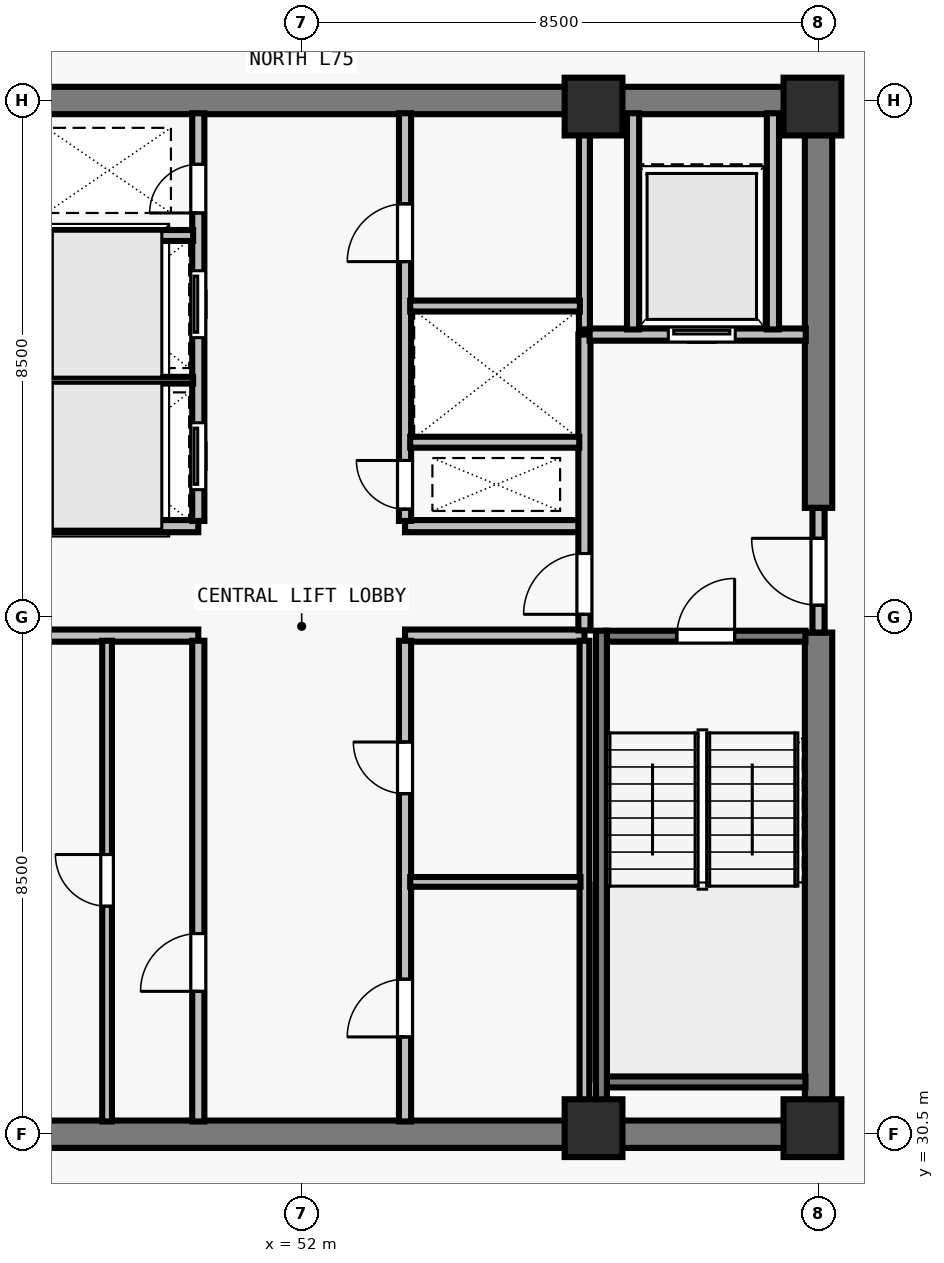
"""IFC4 building model, lengths in metres.
Left out: names, types, materials, properties, quantities, classifications, styles, units other than length and angle.
Written with IfcOpenShell. Run it as: python <this file> out.ifc"""

import sys

from ifc_helpers import new_model, si_unit, direction, frame, frame_2d, origin, origin_2d, place, context, subcontext, project, spatial, rectangle, extrude, element, fill, save


model = new_model("IFC4")
c1 = context("Model", 3, precision=1e-05, world=origin(), true_north=direction((0.0, 1.0)))
c2 = subcontext(c1, "Body", "Model", "MODEL_VIEW")
j1 = project(units=[si_unit("LENGTHUNIT", "METRE"), si_unit("PLANEANGLEUNIT", "RADIAN")], contexts=[c1])
p1 = place(None, origin())
s1 = spatial("IfcSite", under=j1, at=p1, CompositionType="ELEMENT")
p2 = place(p1, origin())
s2 = spatial("IfcBuilding", under=s1, at=p2, CompositionType="ELEMENT")
p3 = place(p2, frame((0.0, 0.0, 272.5)))
s3 = spatial("IfcBuildingStorey", under=s2, at=p3, CompositionType="ELEMENT", Elevation=272.5)
for number, where, z_axis, x_axis in (
    (1, (56.8, 30.6, 0.0), (0.0, 0.0, 1.0), (1.0, 0.0, 0.0)),
    (2, (60.4, 30.6, 0.0), (0.0, 0.0, 1.0), (1.0, 0.0, 0.0)),
    (3, (56.8, 47.4, 0.0), (0.0, 0.0, 1.0), (1.0, 0.0, 0.0)),
    (4, (60.4, 47.4, 0.0), (0.0, 0.0, 1.0), (1.0, 0.0, 0.0)),
):
    element("IfcColumn", number, at=place(p3, frame(where, z_axis=z_axis, x_axis=x_axis)), inside=s3, PredefinedType="COLUMN", context=c2, shape_type="SweptSolid", body=[
        extrude(rectangle(XDim=0.95, YDim=0.95, at=origin_2d()), origin(), (0.0, 0.0, 1.0), 3.5),
    ])
for number, where, z_axis, x_axis in (
    (5, (43.275, 30.5, 0.0), (0.0, 0.0, 1.0), (1.0, 0.0, 0.0)),
    (6, (43.275, 47.5, 0.0), (0.0, 0.0, 1.0), (1.0, 0.0, 0.0)),
):
    element("IfcWall", number, at=place(p3, frame(where, z_axis=z_axis, x_axis=x_axis)), inside=s3, PredefinedType="SHEAR", context=c2, shape_type="SweptSolid", body=[
        extrude(rectangle(XDim=17.45, YDim=0.45, at=frame_2d((8.725, 0.0))), origin(), (0.0, 0.0, 1.0), 3.24),
    ])
p4 = place(p3, frame((60.5, 30.715, 0.0), z_axis=(0.0, 0.0, 1.0), x_axis=(0.0, 1.0, 0.0)))
e7 = element("IfcWall", 7, at=p4, inside=s3, PredefinedType="SHEAR", context=c2, shape_type="SweptSolid", body=[
    extrude(rectangle(XDim=8.035, YDim=0.45, at=frame_2d((4.018, 0.0))), origin(), (0.0, 0.0, 1.0), 3.24),
])
p5 = place(p3, frame((60.5, 40.8, 0.0), z_axis=(0.0, 0.0, 1.0), x_axis=(0.0, 1.0, 0.0)))
e8 = element("IfcWall", 8, at=p5, inside=s3, PredefinedType="SHEAR", context=c2, shape_type="SweptSolid", body=[
    extrude(rectangle(XDim=6.485, YDim=0.45, at=frame_2d((3.242, 0.0))), origin(), (0.0, 0.0, 1.0), 3.24),
])
for number, where, z_axis, x_axis in (
    (9, (47.35, 38.7, 0.0), (0.0, 0.0, 1.0), (1.0, 0.0, 0.0)),
    (10, (47.35, 40.5, 0.0), (0.0, 0.0, 1.0), (1.0, 0.0, 0.0)),
    (11, (53.7, 38.7, 0.0), (0.0, 0.0, 1.0), (1.0, 0.0, 0.0)),
    (12, (53.7, 40.5, 0.0), (0.0, 0.0, 1.0), (1.0, 0.0, 0.0)),
):
    element("IfcWall", number, at=place(p3, frame(where, z_axis=z_axis, x_axis=x_axis)), inside=s3, PredefinedType="SOLIDWALL", context=c2, shape_type="SweptSolid", body=[
        extrude(rectangle(XDim=2.95, YDim=0.2, at=frame_2d((1.475, 0.0))), origin(), (0.0, 0.0, 1.0), 3.24),
    ])
p6 = place(p3, frame((50.3, 30.71, 0.0), z_axis=(0.0, 0.0, 1.0), x_axis=(0.0, 1.0, 0.0)))
e13 = element("IfcWall", 13, at=p6, inside=s3, PredefinedType="SOLIDWALL", context=c2, shape_type="SweptSolid", body=[
    extrude(rectangle(XDim=7.905, YDim=0.2, at=frame_2d((3.953, 0.0))), origin(), (0.0, 0.0, 1.0), 3.24),
])
p7 = place(p6, frame((2.14, 0.0, 0.0)))
e14 = element("IfcOpeningElement", 14, at=p7, cuts=e13, PredefinedType="OPENING", context=c2, shape_type="SweptSolid", body=[
    extrude(rectangle(XDim=0.95, YDim=2.12, at=frame_2d((0.475, 1.06))), frame((0.0, 0.11, 0.0), z_axis=(0.0, -1.0, 0.0), x_axis=(1.0, 0.0, 0.0)), (0.0, 0.0, 1.0), 0.22),
])
p8 = place(p3, frame((53.7, 30.71, 0.0), z_axis=(0.0, 0.0, 1.0), x_axis=(0.0, 1.0, 0.0)))
e15 = element("IfcWall", 15, at=p8, inside=s3, PredefinedType="SOLIDWALL", context=c2, shape_type="SweptSolid", body=[
    extrude(rectangle(XDim=7.905, YDim=0.2, at=frame_2d((3.953, 0.0))), origin(), (0.0, 0.0, 1.0), 3.24),
])
p9 = place(p8, frame((1.39, 0.0, 0.0)))
e16 = element("IfcOpeningElement", 16, at=p9, cuts=e15, PredefinedType="OPENING", context=c2, shape_type="SweptSolid", body=[
    extrude(rectangle(XDim=0.95, YDim=2.12, at=frame_2d((0.475, 1.06))), frame((0.0, 0.11, 0.0), z_axis=(0.0, -1.0, 0.0), x_axis=(1.0, 0.0, 0.0)), (0.0, 0.0, 1.0), 0.22),
])
p10 = place(p8, frame((5.39, 0.0, 0.0)))
e17 = element("IfcOpeningElement", 17, at=p10, cuts=e15, PredefinedType="OPENING", context=c2, shape_type="SweptSolid", body=[
    extrude(rectangle(XDim=0.85, YDim=2.12, at=frame_2d((0.425, 1.06))), frame((0.0, 0.11, 0.0), z_axis=(0.0, -1.0, 0.0), x_axis=(1.0, 0.0, 0.0)), (0.0, 0.0, 1.0), 0.22),
])
p11 = place(p3, frame((50.3, 40.585, 0.0), z_axis=(0.0, 0.0, 1.0), x_axis=(0.0, 1.0, 0.0)))
e18 = element("IfcWall", 18, at=p11, inside=s3, PredefinedType="SOLIDWALL", context=c2, shape_type="SweptSolid", body=[
    extrude(rectangle(XDim=6.705, YDim=0.2, at=frame_2d((3.353, 0.0))), origin(), (0.0, 0.0, 1.0), 3.24),
])
p12 = place(p11, frame((0.515, 0.0, 0.0)))
e19 = element("IfcOpeningElement", 19, at=p12, cuts=e18, PredefinedType="OPENING", context=c2, shape_type="SweptSolid", body=[
    extrude(rectangle(XDim=1.1, YDim=2.2, at=frame_2d((0.55, 1.1))), frame((0.0, 0.11, 0.0), z_axis=(0.0, -1.0, 0.0), x_axis=(1.0, 0.0, 0.0)), (0.0, 0.0, 1.0), 0.22),
])
p13 = place(p11, frame((3.015, 0.0, 0.0)))
e20 = element("IfcOpeningElement", 20, at=p13, cuts=e18, PredefinedType="OPENING", context=c2, shape_type="SweptSolid", body=[
    extrude(rectangle(XDim=1.1, YDim=2.2, at=frame_2d((0.55, 1.1))), frame((0.0, 0.11, 0.0), z_axis=(0.0, -1.0, 0.0), x_axis=(1.0, 0.0, 0.0)), (0.0, 0.0, 1.0), 0.22),
])
p14 = place(p11, frame((5.065, 0.0, 0.0)))
e21 = element("IfcOpeningElement", 21, at=p14, cuts=e18, PredefinedType="OPENING", context=c2, shape_type="SweptSolid", body=[
    extrude(rectangle(XDim=0.8, YDim=2.08, at=frame_2d((0.4, 1.04))), frame((0.0, 0.11, 0.0), z_axis=(0.0, -1.0, 0.0), x_axis=(1.0, 0.0, 0.0)), (0.0, 0.0, 1.0), 0.22),
])
p15 = place(p3, frame((53.7, 40.585, 0.0), z_axis=(0.0, 0.0, 1.0), x_axis=(0.0, 1.0, 0.0)))
e22 = element("IfcWall", 22, at=p15, inside=s3, PredefinedType="SOLIDWALL", context=c2, shape_type="SweptSolid", body=[
    extrude(rectangle(XDim=6.705, YDim=0.2, at=frame_2d((3.353, 0.0))), origin(), (0.0, 0.0, 1.0), 3.24),
])
p16 = place(p15, frame((0.195, 0.0, 0.0)))
e23 = element("IfcOpeningElement", 23, at=p16, cuts=e22, PredefinedType="OPENING", context=c2, shape_type="SweptSolid", body=[
    extrude(rectangle(XDim=0.8, YDim=2.08, at=frame_2d((0.4, 1.04))), frame((0.0, 0.11, 0.0), z_axis=(0.0, -1.0, 0.0), x_axis=(1.0, 0.0, 0.0)), (0.0, 0.0, 1.0), 0.22),
])
p17 = place(p15, frame((4.265, 0.0, 0.0)))
e24 = element("IfcOpeningElement", 24, at=p17, cuts=e22, PredefinedType="OPENING", context=c2, shape_type="SweptSolid", body=[
    extrude(rectangle(XDim=0.95, YDim=2.12, at=frame_2d((0.475, 1.06))), frame((0.0, 0.11, 0.0), z_axis=(0.0, -1.0, 0.0), x_axis=(1.0, 0.0, 0.0)), (0.0, 0.0, 1.0), 0.22),
])
p18 = place(p3, frame((60.5, 38.75, 0.0), z_axis=(0.0, 0.0, 1.0), x_axis=(0.0, 1.0, 0.0)))
e25 = element("IfcWall", 25, at=p18, inside=s3, PredefinedType="SOLIDWALL", context=c2, shape_type="SweptSolid", body=[
    extrude(rectangle(XDim=2.05, YDim=0.2, at=frame_2d((1.025, 0.0))), origin(), (0.0, 0.0, 1.0), 3.24),
])
p19 = place(p18, frame((0.45, 0.0, 0.0)))
e26 = element("IfcOpeningElement", 26, at=p19, cuts=e25, PredefinedType="OPENING", context=c2, shape_type="SweptSolid", body=[
    extrude(rectangle(XDim=1.1, YDim=2.15, at=frame_2d((0.55, 1.075))), frame((0.0, 0.11, 0.0), z_axis=(0.0, -1.0, 0.0), x_axis=(1.0, 0.0, 0.0)), (0.0, 0.0, 1.0), 0.22),
])
p20 = place(p3, frame((56.65, 38.785, 0.0), z_axis=(0.0, 0.0, 1.0), x_axis=(0.0, 1.0, 0.0)))
e27 = element("IfcWall", 27, at=p20, inside=s3, PredefinedType="SOLIDWALL", context=c2, shape_type="SweptSolid", body=[
    extrude(rectangle(XDim=4.865, YDim=0.2, at=frame_2d((2.433, 0.0))), origin(), (0.0, 0.0, 1.0), 3.24),
])
p21 = place(p20, frame((0.265, 0.0, 0.0)))
e28 = element("IfcOpeningElement", 28, at=p21, cuts=e27, PredefinedType="OPENING", context=c2, shape_type="SweptSolid", body=[
    extrude(rectangle(XDim=1.0, YDim=2.15, at=frame_2d((0.5, 1.075))), frame((0.0, 0.11, 0.0), z_axis=(0.0, -1.0, 0.0), x_axis=(1.0, 0.0, 0.0)), (0.0, 0.0, 1.0), 0.22),
])
p22 = place(p3, frame((56.735, 43.65, 0.0), z_axis=(0.0, 0.0, 1.0), x_axis=(1.0, 0.0, 0.0)))
e29 = element("IfcWall", 29, at=p22, inside=s3, PredefinedType="SOLIDWALL", context=c2, shape_type="SweptSolid", body=[
    extrude(rectangle(XDim=3.555, YDim=0.2, at=frame_2d((1.777, 0.0))), origin(), (0.0, 0.0, 1.0), 3.24),
])
p23 = place(p22, frame((1.295, 0.0, 0.0)))
e30 = element("IfcOpeningElement", 30, at=p23, cuts=e29, PredefinedType="OPENING", context=c2, shape_type="SweptSolid", body=[
    extrude(rectangle(XDim=1.1, YDim=2.2, at=frame_2d((0.55, 1.1))), frame((0.0, 0.11, 0.0), z_axis=(0.0, -1.0, 0.0), x_axis=(1.0, 0.0, 0.0)), (0.0, 0.0, 1.0), 0.22),
])
for number, where, z_axis, x_axis in (
    (31, (57.45, 43.735, 0.0), (0.0, 0.0, 1.0), (0.0, 1.0, 0.0)),
    (32, (59.75, 43.735, 0.0), (0.0, 0.0, 1.0), (0.0, 1.0, 0.0)),
):
    element("IfcWall", number, at=place(p3, frame(where, z_axis=z_axis, x_axis=x_axis)), inside=s3, PredefinedType="SOLIDWALL", context=c2, shape_type="SweptSolid", body=[
        extrude(rectangle(XDim=3.555, YDim=0.2, at=frame_2d((1.777, 0.0))), origin(), (0.0, 0.0, 1.0), 3.24),
    ])
p24 = place(p3, frame((48.8, 30.71, 0.0), z_axis=(0.0, 0.0, 1.0), x_axis=(0.0, 1.0, 0.0)))
e33 = element("IfcWall", 33, at=p24, inside=s3, PredefinedType="PARTITIONING", context=c2, shape_type="SweptSolid", body=[
    extrude(rectangle(XDim=7.905, YDim=0.16, at=frame_2d((3.953, 0.0))), origin(), (0.0, 0.0, 1.0), 3.24),
])
p25 = place(p24, frame((3.54, 0.0, 0.0)))
e34 = element("IfcOpeningElement", 34, at=p25, cuts=e33, PredefinedType="OPENING", context=c2, shape_type="SweptSolid", body=[
    extrude(rectangle(XDim=0.85, YDim=2.12, at=frame_2d((0.425, 1.06))), frame((0.0, 0.09, 0.0), z_axis=(0.0, -1.0, 0.0), x_axis=(1.0, 0.0, 0.0)), (0.0, 0.0, 1.0), 0.18),
])
p26 = place(p3, frame((56.65, 30.71, 0.0), z_axis=(0.0, 0.0, 1.0), x_axis=(0.0, 1.0, 0.0)))
e35 = element("IfcWall", 35, at=p26, inside=s3, PredefinedType="PARTITIONING", context=c2, shape_type="SweptSolid", body=[
    extrude(rectangle(XDim=7.905, YDim=0.16, at=frame_2d((3.953, 0.0))), origin(), (0.0, 0.0, 1.0), 3.24),
])
p27 = place(p3, frame((53.785, 34.65, 0.0), z_axis=(0.0, 0.0, 1.0), x_axis=(1.0, 0.0, 0.0)))
e36 = element("IfcWall", 36, at=p27, inside=s3, PredefinedType="PARTITIONING", context=c2, shape_type="SweptSolid", body=[
    extrude(rectangle(XDim=2.8, YDim=0.16, at=frame_2d((1.4, 0.0))), origin(), (0.0, 0.0, 1.0), 3.24),
])
p28 = place(p3, frame((47.435, 42.9, 0.0), z_axis=(0.0, 0.0, 1.0), x_axis=(1.0, 0.0, 0.0)))
e37 = element("IfcWall", 37, at=p28, inside=s3, PredefinedType="PARTITIONING", context=c2, shape_type="SweptSolid", body=[
    extrude(rectangle(XDim=2.78, YDim=0.11, at=frame_2d((1.39, 0.0))), origin(), (0.0, 0.0, 1.0), 3.24),
])
p29 = place(p3, frame((47.425, 45.28, 0.0), z_axis=(0.0, 0.0, 1.0), x_axis=(1.0, 0.0, 0.0)))
e38 = element("IfcWall", 38, at=p29, inside=s3, PredefinedType="SOLIDWALL", context=c2, shape_type="SweptSolid", body=[
    extrude(rectangle(XDim=2.79, YDim=0.18, at=frame_2d((1.395, 0.0))), origin(), (0.0, 0.0, 1.0), 3.24),
])
p30 = place(p3, frame((56.65, 43.735, 0.0), z_axis=(0.0, 0.0, 1.0), x_axis=(0.0, 1.0, 0.0)))
e39 = element("IfcWall", 39, at=p30, inside=s3, PredefinedType="SOLIDWALL", context=c2, shape_type="SweptSolid", body=[
    extrude(rectangle(XDim=3.555, YDim=0.18, at=frame_2d((1.777, 0.0))), origin(), (0.0, 0.0, 1.0), 3.24),
])
p31 = place(p3, frame((53.785, 41.88, 0.0), z_axis=(0.0, 0.0, 1.0), x_axis=(1.0, 0.0, 0.0)))
e40 = element("IfcWall", 40, at=p31, inside=s3, PredefinedType="SOLIDWALL", context=c2, shape_type="SweptSolid", body=[
    extrude(rectangle(XDim=2.78, YDim=0.18, at=frame_2d((1.39, 0.0))), origin(), (0.0, 0.0, 1.0), 3.24),
])
p32 = place(p3, frame((53.785, 44.12, 0.0), z_axis=(0.0, 0.0, 1.0), x_axis=(1.0, 0.0, 0.0)))
e41 = element("IfcWall", 41, at=p32, inside=s3, PredefinedType="SOLIDWALL", context=c2, shape_type="SweptSolid", body=[
    extrude(rectangle(XDim=2.79, YDim=0.18, at=frame_2d((1.395, 0.0))), origin(), (0.0, 0.0, 1.0), 3.24),
])
p33 = place(p3, frame((57.005, 38.69, 0.0), z_axis=(0.0, 0.0, 1.0), x_axis=(1.0, 0.0, 0.0)))
e42 = element("IfcWall", 42, at=p33, inside=s3, PredefinedType="SOLIDWALL", context=c2, shape_type="SweptSolid", body=[
    extrude(rectangle(XDim=3.28, YDim=0.18, at=frame_2d((1.64, 0.0))), origin(), (0.0, 0.0, 1.0), 3.24),
])
p34 = place(p33, frame((1.165, 0.0, 0.0)))
e43 = element("IfcOpeningElement", 43, at=p34, cuts=e42, PredefinedType="OPENING", context=c2, shape_type="SweptSolid", body=[
    extrude(rectangle(XDim=0.95, YDim=2.15, at=frame_2d((0.475, 1.075))), frame((0.0, 0.1, 0.0), z_axis=(0.0, -1.0, 0.0), x_axis=(1.0, 0.0, 0.0)), (0.0, 0.0, 1.0), 0.2),
])
p35 = place(p3, frame((57.005, 31.36, 0.0), z_axis=(0.0, 0.0, 1.0), x_axis=(1.0, 0.0, 0.0)))
e44 = element("IfcWall", 44, at=p35, inside=s3, PredefinedType="SOLIDWALL", context=c2, shape_type="SweptSolid", body=[
    extrude(rectangle(XDim=3.28, YDim=0.18, at=frame_2d((1.64, 0.0))), origin(), (0.0, 0.0, 1.0), 3.24),
])
p36 = place(p3, frame((56.93, 38.78, 0.0), z_axis=(0.0, 0.0, 1.0), x_axis=(0.0, -1.0, 0.0)))
e45 = element("IfcWall", 45, at=p36, inside=s3, PredefinedType="SOLIDWALL", context=c2, shape_type="SweptSolid", body=[
    extrude(rectangle(XDim=8.067, YDim=0.18, at=frame_2d((4.034, 0.0))), origin(), (0.0, 0.0, 1.0), 3.24),
])
p37 = place(p19, origin())
e46 = element("IfcDoor", 46, at=p37, inside=s3, OperationType="SINGLE_SWING_RIGHT", PredefinedType="DOOR", context=c2, shape_type="SweptSolid", body=[
    extrude(rectangle(XDim=1.1, YDim=2.15, at=frame_2d((0.55, 1.075))), frame((0.0, 0.025, 0.0), z_axis=(0.0, -1.0, 0.0), x_axis=(1.0, 0.0, 0.0)), (0.0, 0.0, 1.0), 0.05),
])
fill(e26, e46)
p38 = place(p21, origin())
e47 = element("IfcDoor", 47, at=p38, inside=s3, OperationType="SINGLE_SWING_LEFT", PredefinedType="DOOR", context=c2, shape_type="SweptSolid", body=[
    extrude(rectangle(XDim=1.0, YDim=2.15, at=frame_2d((0.5, 1.075))), frame((0.0, 0.025, 0.0), z_axis=(0.0, -1.0, 0.0), x_axis=(1.0, 0.0, 0.0)), (0.0, 0.0, 1.0), 0.05),
])
fill(e28, e47)
p39 = place(p23, origin())
e48 = element("IfcDoor", 48, at=p39, inside=s3, OperationType="SLIDING_TO_LEFT", PredefinedType="DOOR", context=c2, shape_type="SweptSolid", body=[
    extrude(rectangle(XDim=1.1, YDim=2.2, at=frame_2d((0.55, 1.1))), frame((0.0, 0.025, 0.0), z_axis=(0.0, -1.0, 0.0), x_axis=(1.0, 0.0, 0.0)), (0.0, 0.0, 1.0), 0.05),
])
fill(e30, e48)
p40 = place(p7, origin())
e49 = element("IfcDoor", 49, at=p40, inside=s3, OperationType="SINGLE_SWING_LEFT", PredefinedType="DOOR", context=c2, shape_type="SweptSolid", body=[
    extrude(rectangle(XDim=0.95, YDim=2.12, at=frame_2d((0.475, 1.06))), frame((0.0, 0.025, 0.0), z_axis=(0.0, -1.0, 0.0), x_axis=(1.0, 0.0, 0.0)), (0.0, 0.0, 1.0), 0.05),
])
fill(e14, e49)
p41 = place(p25, origin())
e50 = element("IfcDoor", 50, at=p41, inside=s3, OperationType="SINGLE_SWING_RIGHT", PredefinedType="DOOR", context=c2, shape_type="SweptSolid", body=[
    extrude(rectangle(XDim=0.85, YDim=2.12, at=frame_2d((0.425, 1.06))), frame((0.0, 0.025, 0.0), z_axis=(0.0, -1.0, 0.0), x_axis=(1.0, 0.0, 0.0)), (0.0, 0.0, 1.0), 0.05),
])
fill(e34, e50)
p42 = place(p9, origin())
e51 = element("IfcDoor", 51, at=p42, inside=s3, OperationType="SINGLE_SWING_LEFT", PredefinedType="DOOR", context=c2, shape_type="SweptSolid", body=[
    extrude(rectangle(XDim=0.95, YDim=2.12, at=frame_2d((0.475, 1.06))), frame((0.0, 0.025, 0.0), z_axis=(0.0, -1.0, 0.0), x_axis=(1.0, 0.0, 0.0)), (0.0, 0.0, 1.0), 0.05),
])
fill(e16, e51)
p43 = place(p10, origin())
e52 = element("IfcDoor", 52, at=p43, inside=s3, OperationType="SINGLE_SWING_RIGHT", PredefinedType="DOOR", context=c2, shape_type="SweptSolid", body=[
    extrude(rectangle(XDim=0.85, YDim=2.12, at=frame_2d((0.425, 1.06))), frame((0.0, 0.025, 0.0), z_axis=(0.0, -1.0, 0.0), x_axis=(1.0, 0.0, 0.0)), (0.0, 0.0, 1.0), 0.05),
])
fill(e17, e52)
p44 = place(p12, origin())
e53 = element("IfcDoor", 53, at=p44, inside=s3, OperationType="SLIDING_TO_LEFT", PredefinedType="DOOR", context=c2, shape_type="SweptSolid", body=[
    extrude(rectangle(XDim=1.1, YDim=2.2, at=frame_2d((0.55, 1.1))), frame((0.0, 0.025, 0.0), z_axis=(0.0, -1.0, 0.0), x_axis=(1.0, 0.0, 0.0)), (0.0, 0.0, 1.0), 0.05),
])
fill(e19, e53)
p45 = place(p13, origin())
e54 = element("IfcDoor", 54, at=p45, inside=s3, OperationType="SLIDING_TO_LEFT", PredefinedType="DOOR", context=c2, shape_type="SweptSolid", body=[
    extrude(rectangle(XDim=1.1, YDim=2.2, at=frame_2d((0.55, 1.1))), frame((0.0, 0.025, 0.0), z_axis=(0.0, -1.0, 0.0), x_axis=(1.0, 0.0, 0.0)), (0.0, 0.0, 1.0), 0.05),
])
fill(e20, e54)
p46 = place(p14, origin())
e55 = element("IfcDoor", 55, at=p46, inside=s3, OperationType="SINGLE_SWING_LEFT", PredefinedType="DOOR", context=c2, shape_type="SweptSolid", body=[
    extrude(rectangle(XDim=0.8, YDim=2.08, at=frame_2d((0.4, 1.04))), frame((0.0, 0.025, 0.0), z_axis=(0.0, -1.0, 0.0), x_axis=(1.0, 0.0, 0.0)), (0.0, 0.0, 1.0), 0.05),
])
fill(e21, e55)
p47 = place(p16, origin())
e56 = element("IfcDoor", 56, at=p47, inside=s3, OperationType="SINGLE_SWING_RIGHT", PredefinedType="DOOR", context=c2, shape_type="SweptSolid", body=[
    extrude(rectangle(XDim=0.8, YDim=2.08, at=frame_2d((0.4, 1.04))), frame((0.0, 0.025, 0.0), z_axis=(0.0, -1.0, 0.0), x_axis=(1.0, 0.0, 0.0)), (0.0, 0.0, 1.0), 0.05),
])
fill(e23, e56)
p48 = place(p17, origin())
e57 = element("IfcDoor", 57, at=p48, inside=s3, OperationType="SINGLE_SWING_LEFT", PredefinedType="DOOR", context=c2, shape_type="SweptSolid", body=[
    extrude(rectangle(XDim=0.95, YDim=2.12, at=frame_2d((0.475, 1.06))), frame((0.0, 0.025, 0.0), z_axis=(0.0, -1.0, 0.0), x_axis=(1.0, 0.0, 0.0)), (0.0, 0.0, 1.0), 0.05),
])
fill(e24, e57)
p49 = place(p34, origin())
e58 = element("IfcDoor", 58, at=p49, inside=s3, OperationType="SINGLE_SWING_RIGHT", PredefinedType="DOOR", context=c2, shape_type="SweptSolid", body=[
    extrude(rectangle(XDim=0.95, YDim=2.15, at=frame_2d((0.475, 1.075))), frame((0.0, 0.025, 0.0), z_axis=(0.0, -1.0, 0.0), x_axis=(1.0, 0.0, 0.0)), (0.0, 0.0, 1.0), 0.05),
])
fill(e43, e58)
save(model, sys.argv[1])
